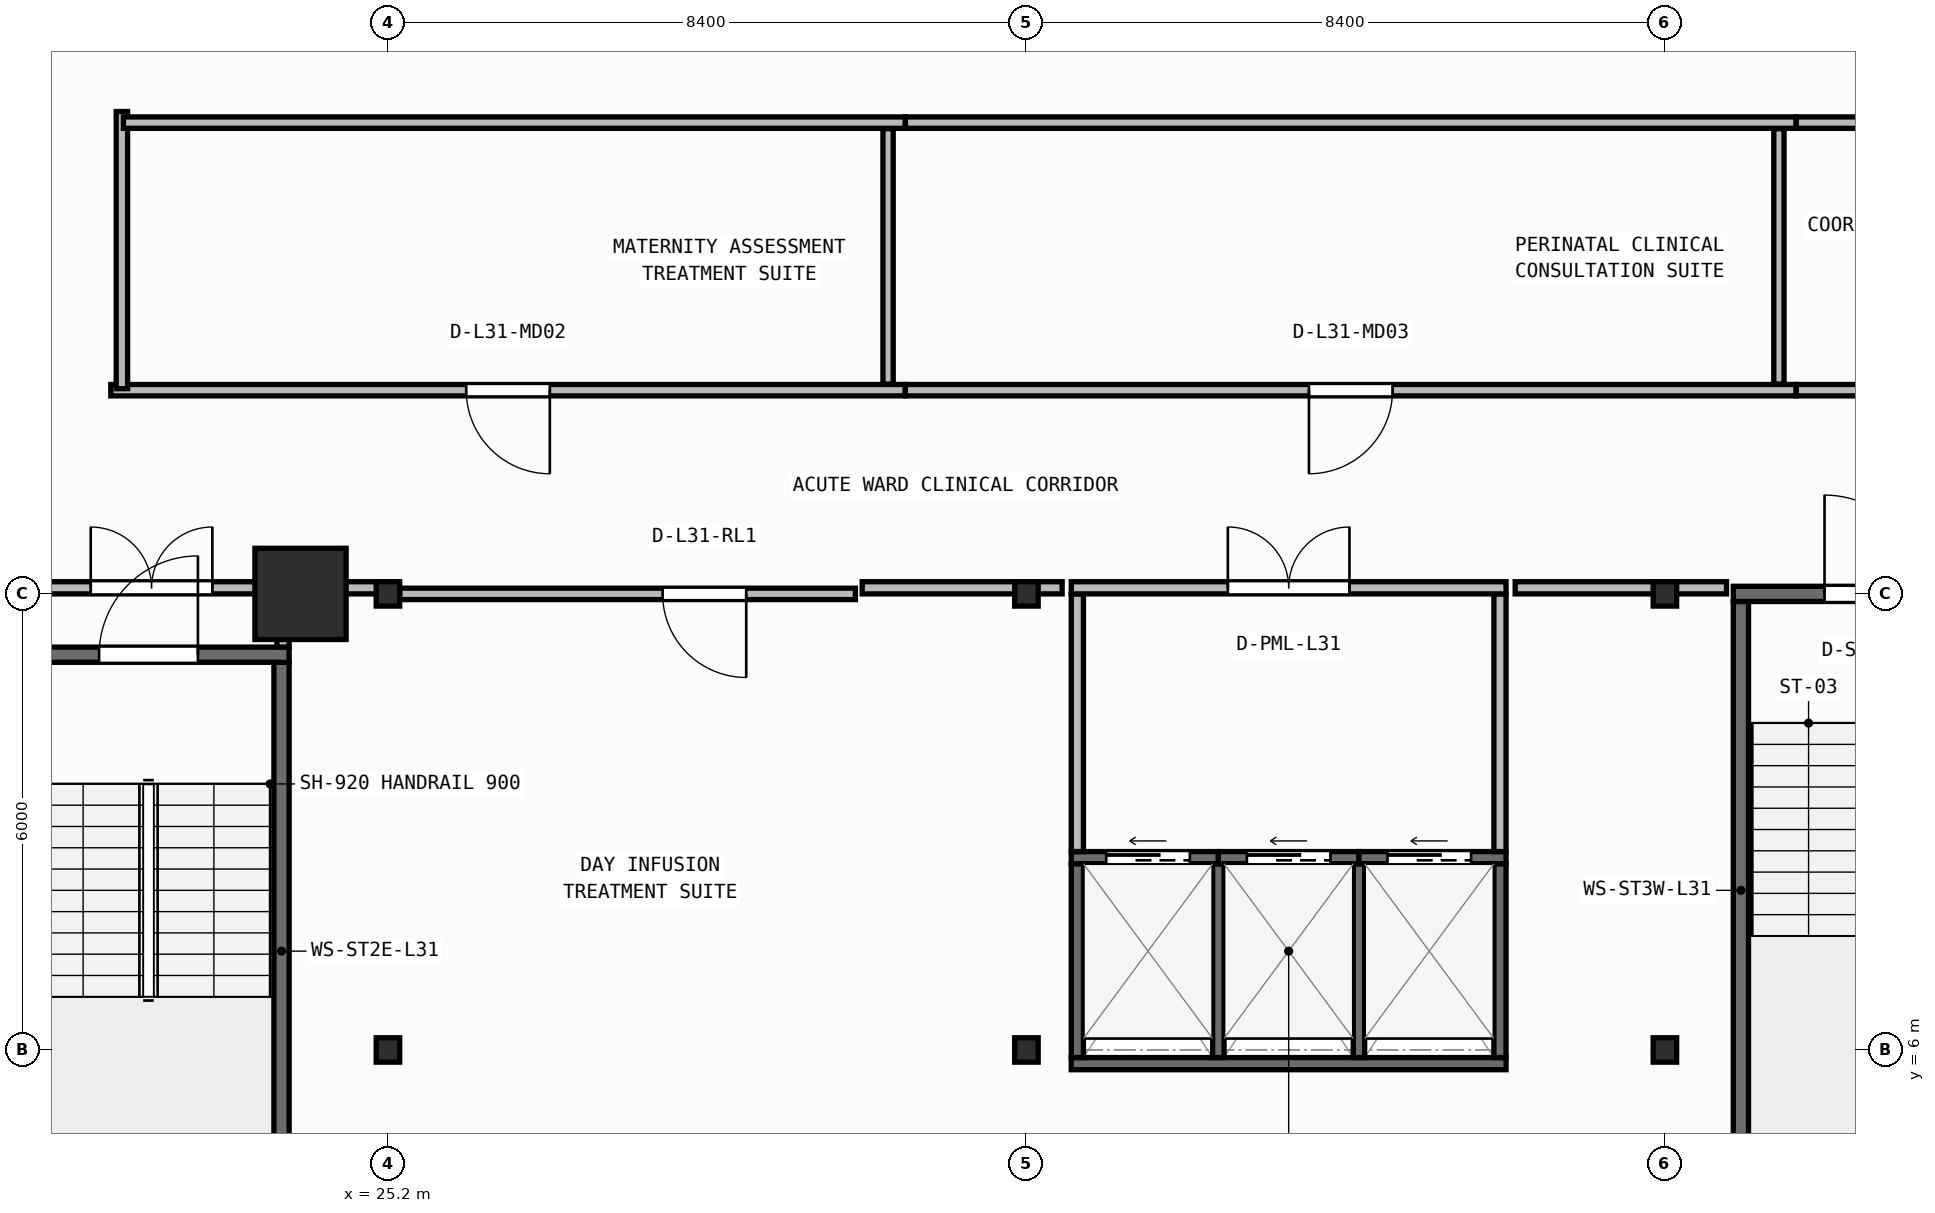
"""IFC4 building model, lengths in metres.
Left out: names, types, materials, properties, quantities, classifications, styles, units other than length and angle.
Written with IfcOpenShell. Run it as: python <this file> out.ifc"""

import sys

from ifc_helpers import new_model, si_unit, direction, frame, frame_2d, origin, origin_2d, place, context, subcontext, project, spatial, rectangle, i_section, extrude, element, fill, save


model = new_model("IFC4")
c1 = context("Model", 3, precision=1e-05, world=origin(), true_north=direction((0.0, 1.0)))
c2 = subcontext(c1, "Body", "Model", "MODEL_VIEW")
j1 = project(units=[si_unit("LENGTHUNIT", "METRE"), si_unit("PLANEANGLEUNIT", "RADIAN")], contexts=[c1])
p1 = place(None, origin())
s1 = spatial("IfcSite", under=j1, at=p1, CompositionType="ELEMENT")
p2 = place(p1, origin())
s2 = spatial("IfcBuilding", under=s1, at=p2, CompositionType="ELEMENT")
p3 = place(p2, frame((0.0, 0.0, 127.05)))
s3 = spatial("IfcBuildingStorey", under=s2, at=p3, CompositionType="ELEMENT", Elevation=127.05)
for number, where, z_axis, x_axis in (
    (1, (25.2, 6.0, 0.0), (0.0, 0.0, 1.0), (1.0, 0.0, 0.0)),
    (2, (33.6, 6.0, 0.0), (0.0, 0.0, 1.0), (1.0, 0.0, 0.0)),
    (3, (42.0, 6.0, 0.0), (0.0, 0.0, 1.0), (1.0, 0.0, 0.0)),
):
    element("IfcColumn", number, at=place(p3, frame(where, z_axis=z_axis, x_axis=x_axis)), inside=s3, PredefinedType="COLUMN", context=c2, shape_type="SweptSolid", body=[
        extrude(i_section(OverallWidth=0.309, OverallDepth=0.321, WebThickness=0.014, FlangeThickness=0.022, FilletRadius=0.017, at=origin_2d()), origin(), (0.0, 0.0, 1.0), 3.95),
    ])
p4 = place(p3, frame((24.05, 12.0, 0.0), z_axis=(0.0, 0.0, 1.0), x_axis=(1.0, 0.0, 0.0)))
e4 = element("IfcColumn", 4, at=p4, inside=s3, PredefinedType="COLUMN", context=c2, shape_type="SweptSolid", body=[
    extrude(rectangle(XDim=1.2, YDim=1.2, at=origin_2d()), origin(), (0.0, 0.0, 1.0), 3.95),
])
for number, where, z_axis, x_axis in (
    (5, (25.2, 12.0, 0.0), (0.0, 0.0, 1.0), (1.0, 0.0, 0.0)),
    (6, (33.6, 12.0, 0.0), (0.0, 0.0, 1.0), (1.0, 0.0, 0.0)),
    (7, (42.0, 12.0, 0.0), (0.0, 0.0, 1.0), (1.0, 0.0, 0.0)),
):
    element("IfcColumn", number, at=place(p3, frame(where, z_axis=z_axis, x_axis=x_axis)), inside=s3, PredefinedType="COLUMN", context=c2, shape_type="SweptSolid", body=[
        extrude(i_section(OverallWidth=0.309, OverallDepth=0.321, WebThickness=0.014, FlangeThickness=0.022, FilletRadius=0.017, at=origin_2d()), origin(), (0.0, 0.0, 1.0), 3.95),
    ])
p5 = place(p3, frame((23.8, 3.5, 0.0), z_axis=(0.0, 0.0, 1.0), x_axis=(0.0, 1.0, 0.0)))
e8 = element("IfcWall", 8, at=p5, inside=s3, PredefinedType="SHEAR", context=c2, shape_type="SweptSolid", body=[
    extrude(rectangle(XDim=7.6, YDim=0.2, at=frame_2d((3.8, 0.0))), origin(), (0.0, 0.0, 1.0), 3.71),
])
p6 = place(p3, frame((20.2, 11.2, 0.0), z_axis=(0.0, 0.0, 1.0), x_axis=(1.0, 0.0, 0.0)))
e9 = element("IfcWall", 9, at=p6, inside=s3, PredefinedType="SHEAR", context=c2, shape_type="SweptSolid", body=[
    extrude(rectangle(XDim=3.7, YDim=0.2, at=frame_2d((1.85, 0.0))), origin(), (0.0, 0.0, 1.0), 3.71),
])
p7 = place(p6, frame((1.2, 0.0, 0.0)))
e10 = element("IfcOpeningElement", 10, at=p7, cuts=e9, PredefinedType="OPENING", context=c2, shape_type="SweptSolid", body=[
    extrude(rectangle(XDim=1.3, YDim=2.15, at=frame_2d((0.65, 1.075))), frame((0.0, 0.11, 0.0), z_axis=(0.0, -1.0, 0.0), x_axis=(1.0, 0.0, 0.0)), (0.0, 0.0, 1.0), 0.22),
])
p8 = place(p3, frame((43.0, 4.3, 0.0), z_axis=(0.0, 0.0, 1.0), x_axis=(0.0, 1.0, 0.0)))
e11 = element("IfcWall", 11, at=p8, inside=s3, PredefinedType="SHEAR", context=c2, shape_type="SweptSolid", body=[
    extrude(rectangle(XDim=7.6, YDim=0.2, at=frame_2d((3.8, 0.0))), origin(), (0.0, 0.0, 1.0), 3.71),
])
p9 = place(p3, frame((42.9, 12.0, 0.0), z_axis=(0.0, 0.0, 1.0), x_axis=(1.0, 0.0, 0.0)))
e12 = element("IfcWall", 12, at=p9, inside=s3, PredefinedType="SHEAR", context=c2, shape_type="SweptSolid", body=[
    extrude(rectangle(XDim=3.7, YDim=0.2, at=frame_2d((1.85, 0.0))), origin(), (0.0, 0.0, 1.0), 3.71),
])
p10 = place(p9, frame((1.2, 0.0, 0.0)))
e13 = element("IfcOpeningElement", 13, at=p10, cuts=e12, PredefinedType="OPENING", context=c2, shape_type="SweptSolid", body=[
    extrude(rectangle(XDim=1.3, YDim=2.15, at=frame_2d((0.65, 1.075))), frame((0.0, 0.11, 0.0), z_axis=(0.0, -1.0, 0.0), x_axis=(1.0, 0.0, 0.0)), (0.0, 0.0, 1.0), 0.22),
])
p11 = place(p3, frame((34.19, 5.82, 0.0), z_axis=(0.0, 0.0, 1.0), x_axis=(1.0, 0.0, 0.0)))
e14 = element("IfcWall", 14, at=p11, inside=s3, PredefinedType="SHEAR", context=c2, shape_type="SweptSolid", body=[
    extrude(rectangle(XDim=5.72, YDim=0.16, at=frame_2d((2.86, 0.0))), origin(), (0.0, 0.0, 1.0), 3.71),
])
for number, where, z_axis, x_axis in (
    (15, (34.27, 5.9, 0.0), (0.0, 0.0, 1.0), (0.0, 1.0, 0.0)),
    (16, (39.83, 5.9, 0.0), (0.0, 0.0, 1.0), (0.0, 1.0, 0.0)),
):
    element("IfcWall", number, at=place(p3, frame(where, z_axis=z_axis, x_axis=x_axis)), inside=s3, PredefinedType="SHEAR", context=c2, shape_type="SweptSolid", body=[
        extrude(rectangle(XDim=2.55, YDim=0.16, at=frame_2d((1.275, 0.0))), origin(), (0.0, 0.0, 1.0), 3.71),
    ])
for number, where, z_axis, x_axis in (
    (17, (36.125, 5.9, 0.0), (0.0, 0.0, 1.0), (0.0, 1.0, 0.0)),
    (18, (37.975, 5.9, 0.0), (0.0, 0.0, 1.0), (0.0, 1.0, 0.0)),
):
    element("IfcWall", number, at=place(p3, frame(where, z_axis=z_axis, x_axis=x_axis)), inside=s3, PredefinedType="SHEAR", context=c2, shape_type="SweptSolid", body=[
        extrude(rectangle(XDim=2.55, YDim=0.15, at=frame_2d((1.275, 0.0))), origin(), (0.0, 0.0, 1.0), 3.71),
    ])
p12 = place(p3, frame((34.19, 8.53, 0.0), z_axis=(0.0, 0.0, 1.0), x_axis=(1.0, 0.0, 0.0)))
e19 = element("IfcWall", 19, at=p12, inside=s3, PredefinedType="SHEAR", context=c2, shape_type="SweptSolid", body=[
    extrude(rectangle(XDim=1.935, YDim=0.16, at=frame_2d((0.968, 0.0))), origin(), (0.0, 0.0, 1.0), 3.71),
])
p13 = place(p12, frame((0.46, 0.0, 0.0)))
e20 = element("IfcOpeningElement", 20, at=p13, cuts=e19, PredefinedType="OPENING", context=c2, shape_type="SweptSolid", body=[
    extrude(rectangle(XDim=1.1, YDim=2.15, at=frame_2d((0.55, 1.075))), frame((0.0, 0.09, 0.0), z_axis=(0.0, -1.0, 0.0), x_axis=(1.0, 0.0, 0.0)), (0.0, 0.0, 1.0), 0.18),
])
p14 = place(p3, frame((36.125, 8.53, 0.0), z_axis=(0.0, 0.0, 1.0), x_axis=(1.0, 0.0, 0.0)))
e21 = element("IfcWall", 21, at=p14, inside=s3, PredefinedType="SHEAR", context=c2, shape_type="SweptSolid", body=[
    extrude(rectangle(XDim=1.85, YDim=0.16, at=frame_2d((0.925, 0.0))), origin(), (0.0, 0.0, 1.0), 3.71),
])
p15 = place(p14, frame((0.375, 0.0, 0.0)))
e22 = element("IfcOpeningElement", 22, at=p15, cuts=e21, PredefinedType="OPENING", context=c2, shape_type="SweptSolid", body=[
    extrude(rectangle(XDim=1.1, YDim=2.15, at=frame_2d((0.55, 1.075))), frame((0.0, 0.09, 0.0), z_axis=(0.0, -1.0, 0.0), x_axis=(1.0, 0.0, 0.0)), (0.0, 0.0, 1.0), 0.18),
])
p16 = place(p3, frame((37.975, 8.53, 0.0), z_axis=(0.0, 0.0, 1.0), x_axis=(1.0, 0.0, 0.0)))
e23 = element("IfcWall", 23, at=p16, inside=s3, PredefinedType="SHEAR", context=c2, shape_type="SweptSolid", body=[
    extrude(rectangle(XDim=1.935, YDim=0.16, at=frame_2d((0.967, 0.0))), origin(), (0.0, 0.0, 1.0), 3.71),
])
p17 = place(p16, frame((0.375, 0.0, 0.0)))
e24 = element("IfcOpeningElement", 24, at=p17, cuts=e23, PredefinedType="OPENING", context=c2, shape_type="SweptSolid", body=[
    extrude(rectangle(XDim=1.1, YDim=2.15, at=frame_2d((0.55, 1.075))), frame((0.0, 0.09, 0.0), z_axis=(0.0, -1.0, 0.0), x_axis=(1.0, 0.0, 0.0)), (0.0, 0.0, 1.0), 0.18),
])
p18 = place(p3, frame((20.28, 12.08, 0.0), z_axis=(0.0, 0.0, 1.0), x_axis=(1.0, 0.0, 0.0)))
e25 = element("IfcWall", 25, at=p18, inside=s3, PredefinedType="PARTITIONING", context=c2, shape_type="SweptSolid", body=[
    extrude(rectangle(XDim=3.62, YDim=0.16, at=frame_2d((1.81, 0.0))), origin(), (0.0, 0.0, 1.0), 3.083),
])
p19 = place(p18, frame((1.01, 0.0, 0.0)))
e26 = element("IfcOpeningElement", 26, at=p19, cuts=e25, PredefinedType="OPENING", context=c2, shape_type="SweptSolid", body=[
    extrude(rectangle(XDim=1.6, YDim=2.05, at=frame_2d((0.8, 1.025))), frame((0.0, 0.09, 0.0), z_axis=(0.0, -1.0, 0.0), x_axis=(1.0, 0.0, 0.0)), (0.0, 0.0, 1.0), 0.18),
])
p20 = place(p3, frame((23.82, 11.3, 0.0), z_axis=(0.0, 0.0, 1.0), x_axis=(0.0, 1.0, 0.0)))
e27 = element("IfcWall", 27, at=p20, inside=s3, PredefinedType="PARTITIONING", context=c2, shape_type="SweptSolid", body=[
    extrude(rectangle(XDim=0.7, YDim=0.16, at=frame_2d((0.35, 0.0))), origin(), (0.0, 0.0, 1.0), 3.71),
])
for number, where, z_axis, x_axis in (
    (28, (34.27, 8.61, 0.0), (0.0, 0.0, 1.0), (0.0, 1.0, 0.0)),
    (29, (39.83, 8.61, 0.0), (0.0, 0.0, 1.0), (0.0, 1.0, 0.0)),
):
    element("IfcWall", number, at=place(p3, frame(where, z_axis=z_axis, x_axis=x_axis)), inside=s3, PredefinedType="PARTITIONING", context=c2, shape_type="SweptSolid", body=[
        extrude(rectangle(XDim=3.39, YDim=0.16, at=frame_2d((1.695, 0.0))), origin(), (0.0, 0.0, 1.0), 3.71),
    ])
p21 = place(p3, frame((34.19, 12.08, 0.0), z_axis=(0.0, 0.0, 1.0), x_axis=(1.0, 0.0, 0.0)))
e30 = element("IfcWall", 30, at=p21, inside=s3, PredefinedType="PARTITIONING", context=c2, shape_type="SweptSolid", body=[
    extrude(rectangle(XDim=5.72, YDim=0.16, at=frame_2d((2.86, 0.0))), origin(), (0.0, 0.0, 1.0), 3.083),
])
p22 = place(p21, frame((2.06, 0.0, 0.0)))
e31 = element("IfcOpeningElement", 31, at=p22, cuts=e30, PredefinedType="OPENING", context=c2, shape_type="SweptSolid", body=[
    extrude(rectangle(XDim=1.6, YDim=2.05, at=frame_2d((0.8, 1.025))), frame((0.0, 0.09, 0.0), z_axis=(0.0, -1.0, 0.0), x_axis=(1.0, 0.0, 0.0)), (0.0, 0.0, 1.0), 0.18),
])
p23 = place(p3, frame((31.35, 12.0, 0.0), z_axis=(0.0, 0.0, 1.0), x_axis=(-1.0, 0.0, 0.0)))
e32 = element("IfcWall", 32, at=p23, inside=s3, PredefinedType="PARTITIONING", context=c2, shape_type="SweptSolid", body=[
    extrude(rectangle(XDim=5.996, YDim=0.15, at=frame_2d((2.998, 0.0))), origin(), (0.0, 0.0, 1.0), 3.083),
])
p24 = place(p23, frame((1.436, 0.0, 0.0)))
e33 = element("IfcOpeningElement", 33, at=p24, cuts=e32, PredefinedType="OPENING", context=c2, shape_type="SweptSolid", body=[
    extrude(rectangle(XDim=1.1, YDim=2.1, at=frame_2d((0.55, 1.05))), frame((0.0, 0.085, 0.0), z_axis=(0.0, -1.0, 0.0), x_axis=(1.0, 0.0, 0.0)), (0.0, 0.0, 1.0), 0.17),
])
p25 = place(p3, frame((32.006, 14.68, 0.0), z_axis=(0.0, 0.0, 1.0), x_axis=(-1.0, 0.0, 0.0)))
e34 = element("IfcWall", 34, at=p25, inside=s3, PredefinedType="PARTITIONING", context=c2, shape_type="SweptSolid", body=[
    extrude(rectangle(XDim=10.452, YDim=0.15, at=frame_2d((5.226, 0.0))), origin(), (0.0, 0.0, 1.0), 3.71),
])
p26 = place(p25, frame((4.676, 0.0, 0.0)))
e35 = element("IfcOpeningElement", 35, at=p26, cuts=e34, PredefinedType="OPENING", context=c2, shape_type="SweptSolid", body=[
    extrude(rectangle(XDim=1.1, YDim=2.1, at=frame_2d((0.55, 1.05))), frame((0.0, 0.085, 0.0), z_axis=(0.0, -1.0, 0.0), x_axis=(1.0, 0.0, 0.0)), (0.0, 0.0, 1.0), 0.17),
])
p27 = place(p3, frame((43.726, 14.68, 0.0), z_axis=(0.0, 0.0, 1.0), x_axis=(-1.0, 0.0, 0.0)))
e36 = element("IfcWall", 36, at=p27, inside=s3, PredefinedType="PARTITIONING", context=c2, shape_type="SweptSolid", body=[
    extrude(rectangle(XDim=11.718, YDim=0.15, at=frame_2d((5.859, 0.0))), origin(), (0.0, 0.0, 1.0), 3.71),
])
p28 = place(p27, frame((5.309, 0.0, 0.0)))
e37 = element("IfcOpeningElement", 37, at=p28, cuts=e36, PredefinedType="OPENING", context=c2, shape_type="SweptSolid", body=[
    extrude(rectangle(XDim=1.1, YDim=2.1, at=frame_2d((0.55, 1.05))), frame((0.0, 0.085, 0.0), z_axis=(0.0, -1.0, 0.0), x_axis=(1.0, 0.0, 0.0)), (0.0, 0.0, 1.0), 0.17),
])
p29 = place(p3, frame((49.396, 14.68, 0.0), z_axis=(0.0, 0.0, 1.0), x_axis=(-1.0, 0.0, 0.0)))
e38 = element("IfcWall", 38, at=p29, inside=s3, PredefinedType="PARTITIONING", context=c2, shape_type="SweptSolid", body=[
    extrude(rectangle(XDim=5.668, YDim=0.15, at=frame_2d((2.834, 0.0))), origin(), (0.0, 0.0, 1.0), 3.71),
])
p30 = place(p29, frame((2.284, 0.0, 0.0)))
e39 = element("IfcOpeningElement", 39, at=p30, cuts=e38, PredefinedType="OPENING", context=c2, shape_type="SweptSolid", body=[
    extrude(rectangle(XDim=1.1, YDim=2.1, at=frame_2d((0.55, 1.05))), frame((0.0, 0.085, 0.0), z_axis=(0.0, -1.0, 0.0), x_axis=(1.0, 0.0, 0.0)), (0.0, 0.0, 1.0), 0.17),
])
p31 = place(p3, frame((21.7, 14.7, 0.0), z_axis=(0.0, 0.0, 1.0), x_axis=(0.0, 1.0, 0.0)))
e40 = element("IfcWall", 40, at=p31, inside=s3, PredefinedType="PARTITIONING", context=c2, shape_type="SweptSolid", body=[
    extrude(rectangle(XDim=3.646, YDim=0.15, at=frame_2d((1.823, 0.0))), origin(), (0.0, 0.0, 1.0), 3.71),
])
p32 = place(p3, frame((21.72, 18.2, 0.0), z_axis=(0.0, 0.0, 1.0), x_axis=(1.0, 0.0, 0.0)))
e41 = element("IfcWall", 41, at=p32, inside=s3, PredefinedType="PARTITIONING", context=c2, shape_type="SweptSolid", body=[
    extrude(rectangle(XDim=10.286, YDim=0.15, at=frame_2d((5.143, 0.0))), origin(), (0.0, 0.0, 1.0), 3.71),
])
p33 = place(p3, frame((32.008, 18.2, 0.0), z_axis=(0.0, 0.0, 1.0), x_axis=(1.0, 0.0, 0.0)))
e42 = element("IfcWall", 42, at=p33, inside=s3, PredefinedType="PARTITIONING", context=c2, shape_type="SweptSolid", body=[
    extrude(rectangle(XDim=11.718, YDim=0.15, at=frame_2d((5.859, 0.0))), origin(), (0.0, 0.0, 1.0), 3.71),
])
p34 = place(p3, frame((43.728, 18.2, 0.0), z_axis=(0.0, 0.0, 1.0), x_axis=(1.0, 0.0, 0.0)))
e43 = element("IfcWall", 43, at=p34, inside=s3, PredefinedType="PARTITIONING", context=c2, shape_type="SweptSolid", body=[
    extrude(rectangle(XDim=5.668, YDim=0.15, at=frame_2d((2.834, 0.0))), origin(), (0.0, 0.0, 1.0), 3.71),
])
for number, where, z_axis, x_axis in (
    (44, (31.78, 14.76, 0.0), (0.0, 0.0, 1.0), (0.0, 1.0, 0.0)),
    (45, (43.5, 14.76, 0.0), (0.0, 0.0, 1.0), (0.0, 1.0, 0.0)),
):
    element("IfcWall", number, at=place(p3, frame(where, z_axis=z_axis, x_axis=x_axis)), inside=s3, PredefinedType="PARTITIONING", context=c2, shape_type="SweptSolid", body=[
        extrude(rectangle(XDim=3.36, YDim=0.135, at=frame_2d((1.68, 0.0))), origin(), (0.0, 0.0, 1.0), 3.71),
    ])
p35 = place(p3, frame((24.02, 12.08, 0.0), z_axis=(0.0, 0.0, 1.0), x_axis=(1.0, 0.0, 0.0)))
e46 = element("IfcWall", 46, at=p35, inside=s3, PredefinedType="PARTITIONING", context=c2, shape_type="SweptSolid", body=[
    extrude(rectangle(XDim=1.245, YDim=0.16, at=frame_2d((0.623, 0.0))), origin(), (0.0, 0.0, 1.0), 3.083),
])
p36 = place(p3, frame((31.439, 12.08, 0.0), z_axis=(0.0, 0.0, 1.0), x_axis=(1.0, 0.0, 0.0)))
e47 = element("IfcWall", 47, at=p36, inside=s3, PredefinedType="PARTITIONING", context=c2, shape_type="SweptSolid", body=[
    extrude(rectangle(XDim=2.631, YDim=0.16, at=frame_2d((1.315, 0.0))), origin(), (0.0, 0.0, 1.0), 3.083),
])
p37 = place(p3, frame((40.03, 12.08, 0.0), z_axis=(0.0, 0.0, 1.0), x_axis=(1.0, 0.0, 0.0)))
e48 = element("IfcWall", 48, at=p37, inside=s3, PredefinedType="PARTITIONING", context=c2, shape_type="SweptSolid", body=[
    extrude(rectangle(XDim=2.781, YDim=0.16, at=frame_2d((1.39, 0.0))), origin(), (0.0, 0.0, 1.0), 3.083),
])
p38 = place(p7, origin())
e49 = element("IfcDoor", 49, at=p38, inside=s3, OperationType="SINGLE_SWING_RIGHT", PredefinedType="DOOR", context=c2, shape_type="SweptSolid", body=[
    extrude(rectangle(XDim=1.3, YDim=2.15, at=frame_2d((0.65, 1.075))), frame((0.0, 0.025, 0.0), z_axis=(0.0, -1.0, 0.0), x_axis=(1.0, 0.0, 0.0)), (0.0, 0.0, 1.0), 0.05),
])
fill(e10, e49)
p39 = place(p10, origin())
e50 = element("IfcDoor", 50, at=p39, inside=s3, OperationType="SINGLE_SWING_LEFT", PredefinedType="DOOR", context=c2, shape_type="SweptSolid", body=[
    extrude(rectangle(XDim=1.3, YDim=2.15, at=frame_2d((0.65, 1.075))), frame((0.0, 0.025, 0.0), z_axis=(0.0, -1.0, 0.0), x_axis=(1.0, 0.0, 0.0)), (0.0, 0.0, 1.0), 0.05),
])
fill(e13, e50)
p40 = place(p13, origin())
e51 = element("IfcDoor", 51, at=p40, inside=s3, OperationType="SLIDING_TO_LEFT", PredefinedType="DOOR", context=c2, shape_type="SweptSolid", body=[
    extrude(rectangle(XDim=1.1, YDim=2.15, at=frame_2d((0.55, 1.075))), frame((0.0, 0.025, 0.0), z_axis=(0.0, -1.0, 0.0), x_axis=(1.0, 0.0, 0.0)), (0.0, 0.0, 1.0), 0.05),
])
fill(e20, e51)
p41 = place(p15, origin())
e52 = element("IfcDoor", 52, at=p41, inside=s3, OperationType="SLIDING_TO_LEFT", PredefinedType="DOOR", context=c2, shape_type="SweptSolid", body=[
    extrude(rectangle(XDim=1.1, YDim=2.15, at=frame_2d((0.55, 1.075))), frame((0.0, 0.025, 0.0), z_axis=(0.0, -1.0, 0.0), x_axis=(1.0, 0.0, 0.0)), (0.0, 0.0, 1.0), 0.05),
])
fill(e22, e52)
p42 = place(p17, origin())
e53 = element("IfcDoor", 53, at=p42, inside=s3, OperationType="SLIDING_TO_LEFT", PredefinedType="DOOR", context=c2, shape_type="SweptSolid", body=[
    extrude(rectangle(XDim=1.1, YDim=2.15, at=frame_2d((0.55, 1.075))), frame((0.0, 0.025, 0.0), z_axis=(0.0, -1.0, 0.0), x_axis=(1.0, 0.0, 0.0)), (0.0, 0.0, 1.0), 0.05),
])
fill(e24, e53)
p43 = place(p19, origin())
e54 = element("IfcDoor", 54, at=p43, inside=s3, OperationType="DOUBLE_DOOR_SINGLE_SWING", PredefinedType="DOOR", context=c2, shape_type="SweptSolid", body=[
    extrude(rectangle(XDim=1.6, YDim=2.05, at=frame_2d((0.8, 1.025))), frame((0.0, 0.025, 0.0), z_axis=(0.0, -1.0, 0.0), x_axis=(1.0, 0.0, 0.0)), (0.0, 0.0, 1.0), 0.05),
])
fill(e26, e54)
p44 = place(p22, origin())
e55 = element("IfcDoor", 55, at=p44, inside=s3, OperationType="DOUBLE_DOOR_SINGLE_SWING", PredefinedType="DOOR", context=c2, shape_type="SweptSolid", body=[
    extrude(rectangle(XDim=1.6, YDim=2.05, at=frame_2d((0.8, 1.025))), frame((0.0, 0.025, 0.0), z_axis=(0.0, -1.0, 0.0), x_axis=(1.0, 0.0, 0.0)), (0.0, 0.0, 1.0), 0.05),
])
fill(e31, e55)
p45 = place(p24, origin())
e56 = element("IfcDoor", 56, at=p45, inside=s3, OperationType="SINGLE_SWING_LEFT", PredefinedType="DOOR", context=c2, shape_type="SweptSolid", body=[
    extrude(rectangle(XDim=1.1, YDim=2.1, at=frame_2d((0.55, 1.05))), frame((0.0, 0.025, 0.0), z_axis=(0.0, -1.0, 0.0), x_axis=(1.0, 0.0, 0.0)), (0.0, 0.0, 1.0), 0.05),
])
fill(e33, e56)
p46 = place(p26, origin())
e57 = element("IfcDoor", 57, at=p46, inside=s3, OperationType="SINGLE_SWING_LEFT", PredefinedType="DOOR", context=c2, shape_type="SweptSolid", body=[
    extrude(rectangle(XDim=1.1, YDim=2.1, at=frame_2d((0.55, 1.05))), frame((0.0, 0.025, 0.0), z_axis=(0.0, -1.0, 0.0), x_axis=(1.0, 0.0, 0.0)), (0.0, 0.0, 1.0), 0.05),
])
fill(e35, e57)
p47 = place(p28, origin())
e58 = element("IfcDoor", 58, at=p47, inside=s3, OperationType="SINGLE_SWING_RIGHT", PredefinedType="DOOR", context=c2, shape_type="SweptSolid", body=[
    extrude(rectangle(XDim=1.1, YDim=2.1, at=frame_2d((0.55, 1.05))), frame((0.0, 0.025, 0.0), z_axis=(0.0, -1.0, 0.0), x_axis=(1.0, 0.0, 0.0)), (0.0, 0.0, 1.0), 0.05),
])
fill(e37, e58)
save(model, sys.argv[1])
